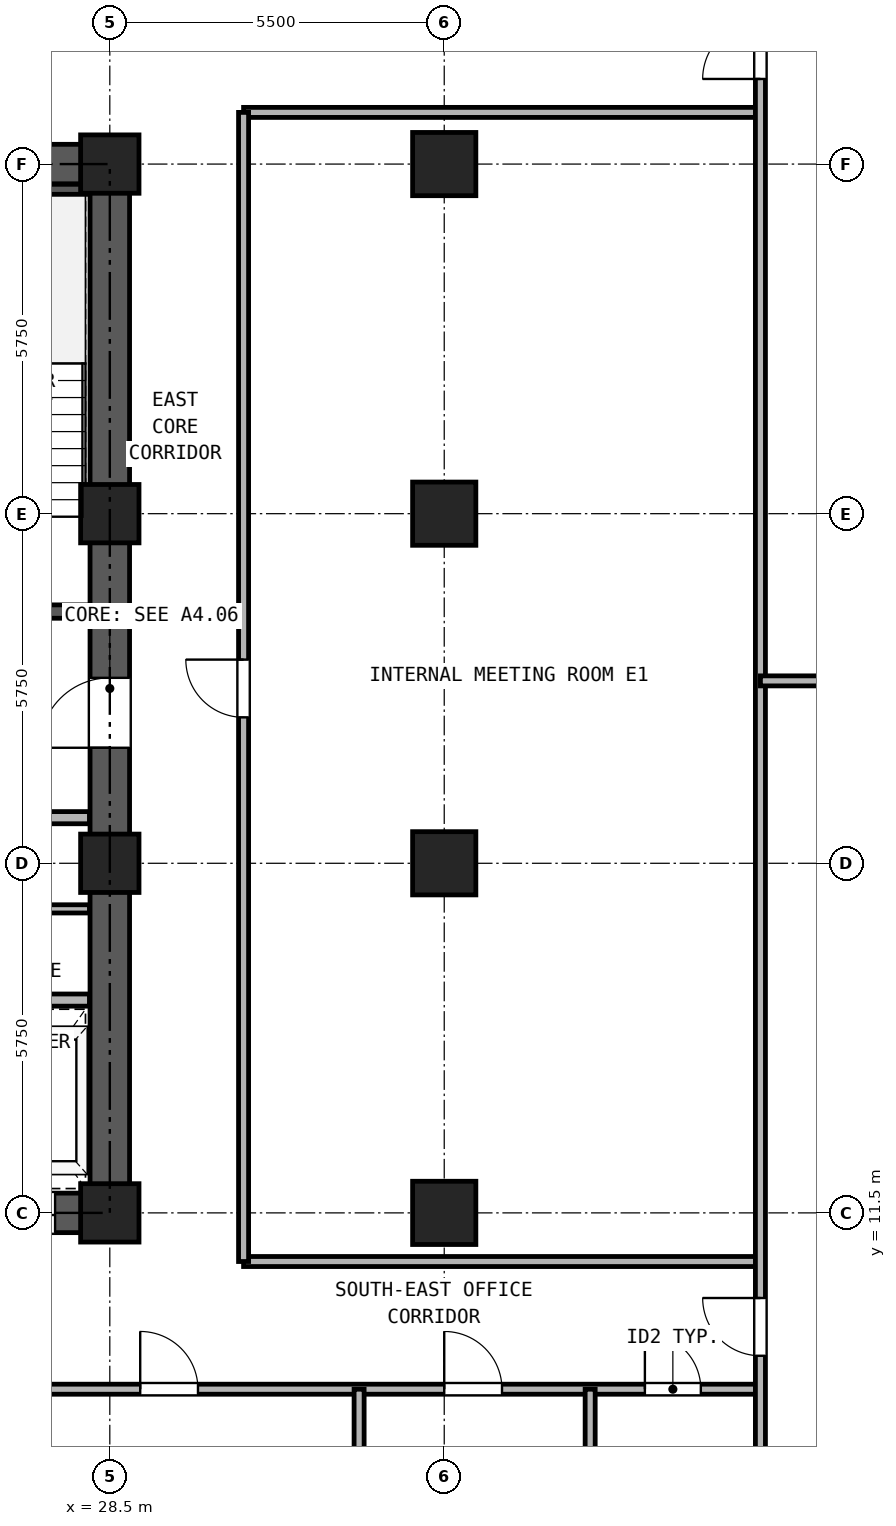
"""IFC4 building model, lengths in metres.
Left out: names, types, materials, properties, quantities, classifications, styles, units other than length and angle.
Written with IfcOpenShell. Run it as: python <this file> out.ifc"""

import sys

from ifc_helpers import new_model, si_unit, direction, frame, frame_2d, origin, origin_2d, place, context, subcontext, project, spatial, rectangle, hollow_rectangle, extrude, source, transform, mapped, element, fill, save


model = new_model("IFC4")
c1 = context("Model", 3, precision=1e-05, world=origin(), true_north=direction((0.0, 1.0)))
c2 = subcontext(c1, "Body", "Model", "MODEL_VIEW")
j1 = project(units=[si_unit("LENGTHUNIT", "METRE"), si_unit("PLANEANGLEUNIT", "RADIAN")], contexts=[c1])
p1 = place(None, origin())
s1 = spatial("IfcSite", under=j1, at=p1, CompositionType="ELEMENT")
p2 = place(p1, origin())
s2 = spatial("IfcBuilding", under=s1, at=p2, CompositionType="ELEMENT")
p3 = place(p2, frame((0.0, 0.0, 69.3)))
s3 = spatial("IfcBuildingStorey", under=s2, at=p3, CompositionType="ELEMENT", Elevation=69.3)
m1 = source(origin(), c2, "Body", "SweptSolid", [
    extrude(hollow_rectangle(XDim=0.96, YDim=0.96, WallThickness=0.06, at=origin_2d()), origin(), (0.0, 0.0, 1.0), 3.32),
])
for number, where, z_axis, x_axis in (
    (1, (28.5, 11.5, 0.0), (0.0, 0.0, 1.0), (1.0, 0.0, 0.0)),
    (2, (28.5, 17.25, 0.0), (0.0, 0.0, 1.0), (1.0, 0.0, 0.0)),
    (3, (28.5, 23.0, 0.0), (0.0, 0.0, 1.0), (1.0, 0.0, 0.0)),
    (4, (28.5, 28.75, 0.0), (0.0, 0.0, 1.0), (1.0, 0.0, 0.0)),
):
    element("IfcColumn", number, at=place(p3, frame(where, z_axis=z_axis, x_axis=x_axis)), inside=s3, PredefinedType="COLUMN", context=c2, shape_type="MappedRepresentation", body=[
        mapped(m1, transform((0.0, 0.0, 0.0), x_axis=(1.0, 0.0, 0.0), y_axis=(0.0, 1.0, 0.0), z_axis=(0.0, 0.0, 1.0), scale=1.0)),
    ])
m2 = source(origin(), c2, "Body", "SweptSolid", [
    extrude(hollow_rectangle(XDim=1.04, YDim=1.04, WallThickness=0.065, at=origin_2d()), origin(), (0.0, 0.0, 1.0), 3.32),
])
for number, where, z_axis, x_axis in (
    (5, (34.0, 11.5, 0.0), (0.0, 0.0, 1.0), (1.0, 0.0, 0.0)),
    (6, (34.0, 17.25, 0.0), (0.0, 0.0, 1.0), (1.0, 0.0, 0.0)),
    (7, (34.0, 23.0, 0.0), (0.0, 0.0, 1.0), (1.0, 0.0, 0.0)),
    (8, (34.0, 28.75, 0.0), (0.0, 0.0, 1.0), (1.0, 0.0, 0.0)),
):
    element("IfcColumn", number, at=place(p3, frame(where, z_axis=z_axis, x_axis=x_axis)), inside=s3, PredefinedType="COLUMN", context=c2, shape_type="MappedRepresentation", body=[
        mapped(m2, transform((0.0, 0.0, 0.0), x_axis=(1.0, 0.0, 0.0), y_axis=(0.0, 1.0, 0.0), z_axis=(0.0, 0.0, 1.0), scale=1.0)),
    ])
p4 = place(p3, frame((18.175, 11.5, 0.0), z_axis=(0.0, 0.0, 1.0), x_axis=(1.0, 0.0, 0.0)))
e9 = element("IfcWall", 9, at=p4, inside=s3, PredefinedType="SHEAR", context=c2, shape_type="SweptSolid", body=[
    extrude(rectangle(XDim=10.65, YDim=0.65, at=frame_2d((5.325, 0.0))), origin(), (0.0, 0.0, 1.0), 3.32),
])
p5 = place(p4, frame((1.195, 0.0, 0.0)))
e10 = element("IfcOpeningElement", 10, at=p5, cuts=e9, PredefinedType="OPENING", context=c2, shape_type="SweptSolid", body=[
    extrude(rectangle(XDim=1.1, YDim=2.25, at=frame_2d((0.55, 1.125))), frame((0.0, 0.335, 0.0), z_axis=(0.0, -1.0, 0.0), x_axis=(1.0, 0.0, 0.0)), (0.0, 0.0, 1.0), 0.67),
])
p6 = place(p4, frame((3.495, 0.0, 0.0)))
e11 = element("IfcOpeningElement", 11, at=p6, cuts=e9, PredefinedType="OPENING", context=c2, shape_type="SweptSolid", body=[
    extrude(rectangle(XDim=1.1, YDim=2.25, at=frame_2d((0.55, 1.125))), frame((0.0, 0.335, 0.0), z_axis=(0.0, -1.0, 0.0), x_axis=(1.0, 0.0, 0.0)), (0.0, 0.0, 1.0), 0.67),
])
p7 = place(p4, frame((5.925, 0.0, 0.0)))
e12 = element("IfcOpeningElement", 12, at=p7, cuts=e9, PredefinedType="OPENING", context=c2, shape_type="SweptSolid", body=[
    extrude(rectangle(XDim=1.1, YDim=2.25, at=frame_2d((0.55, 1.125))), frame((0.0, 0.335, 0.0), z_axis=(0.0, -1.0, 0.0), x_axis=(1.0, 0.0, 0.0)), (0.0, 0.0, 1.0), 0.67),
])
p8 = place(p4, frame((8.325, 0.0, 0.0)))
e13 = element("IfcOpeningElement", 13, at=p8, cuts=e9, PredefinedType="OPENING", context=c2, shape_type="SweptSolid", body=[
    extrude(rectangle(XDim=1.1, YDim=2.25, at=frame_2d((0.55, 1.125))), frame((0.0, 0.335, 0.0), z_axis=(0.0, -1.0, 0.0), x_axis=(1.0, 0.0, 0.0)), (0.0, 0.0, 1.0), 0.67),
])
p9 = place(p3, frame((18.175, 28.75, 0.0), z_axis=(0.0, 0.0, 1.0), x_axis=(1.0, 0.0, 0.0)))
e14 = element("IfcWall", 14, at=p9, inside=s3, PredefinedType="SHEAR", context=c2, shape_type="SweptSolid", body=[
    extrude(rectangle(XDim=10.65, YDim=0.65, at=frame_2d((5.325, 0.0))), origin(), (0.0, 0.0, 1.0), 3.32),
])
p10 = place(p9, frame((4.205, 0.0, 0.0)))
e15 = element("IfcOpeningElement", 15, at=p10, cuts=e14, PredefinedType="OPENING", context=c2, shape_type="SweptSolid", body=[
    extrude(rectangle(XDim=0.9, YDim=2.05, at=frame_2d((0.45, 1.025))), frame((0.0, 0.335, 0.0), z_axis=(0.0, -1.0, 0.0), x_axis=(1.0, 0.0, 0.0)), (0.0, 0.0, 1.0), 0.67),
])
p11 = place(p9, frame((5.745, 0.0, 0.0)))
e16 = element("IfcOpeningElement", 16, at=p11, cuts=e14, PredefinedType="OPENING", context=c2, shape_type="SweptSolid", body=[
    extrude(rectangle(XDim=0.9, YDim=2.05, at=frame_2d((0.45, 1.025))), frame((0.0, 0.335, 0.0), z_axis=(0.0, -1.0, 0.0), x_axis=(1.0, 0.0, 0.0)), (0.0, 0.0, 1.0), 0.67),
])
p12 = place(p3, frame((28.5, 11.825, 0.0), z_axis=(0.0, 0.0, 1.0), x_axis=(0.0, 1.0, 0.0)))
e17 = element("IfcWall", 17, at=p12, inside=s3, PredefinedType="SHEAR", context=c2, shape_type="SweptSolid", body=[
    extrude(rectangle(XDim=16.6, YDim=0.65, at=frame_2d((8.3, 0.0))), origin(), (0.0, 0.0, 1.0), 3.32),
])
p13 = place(p12, frame((7.325, 0.0, 0.0)))
e18 = element("IfcOpeningElement", 18, at=p13, cuts=e17, PredefinedType="OPENING", context=c2, shape_type="SweptSolid", body=[
    extrude(rectangle(XDim=1.15, YDim=2.2, at=frame_2d((0.575, 1.1))), frame((0.0, 0.335, 0.0), z_axis=(0.0, -1.0, 0.0), x_axis=(1.0, 0.0, 0.0)), (0.0, 0.0, 1.0), 0.67),
])
p14 = place(p3, frame((25.13, 28.335, 0.0), z_axis=(0.0, 0.0, 1.0), x_axis=(1.0, 0.0, 0.0)))
e19 = element("IfcWall", 19, at=p14, inside=s3, PredefinedType="PARTITIONING", context=c2, shape_type="SweptSolid", body=[
    extrude(rectangle(XDim=3.035, YDim=0.165, at=frame_2d((1.518, 0.0))), origin(), (0.0, 0.0, 1.0), 3.32),
])
p15 = place(p3, frame((25.13, 21.39, 0.0), z_axis=(0.0, 0.0, 1.0), x_axis=(1.0, 0.0, 0.0)))
e20 = element("IfcWall", 20, at=p15, inside=s3, PredefinedType="SOLIDWALL", context=c2, shape_type="SweptSolid", body=[
    extrude(rectangle(XDim=3.035, YDim=0.22, at=frame_2d((1.518, 0.0))), origin(), (0.0, 0.0, 1.0), 3.32),
])
p16 = place(p15, frame((0.92, 0.0, 0.0)))
e21 = element("IfcOpeningElement", 21, at=p16, cuts=e20, PredefinedType="OPENING", context=c2, shape_type="SweptSolid", body=[
    extrude(rectangle(XDim=1.15, YDim=2.2, at=frame_2d((0.575, 1.1))), frame((0.0, 0.12, 0.0), z_axis=(0.0, -1.0, 0.0), x_axis=(1.0, 0.0, 0.0)), (0.0, 0.0, 1.0), 0.24),
])
p17 = place(p3, frame((18.835, 18.0, 0.0), z_axis=(0.0, 0.0, 1.0), x_axis=(1.0, 0.0, 0.0)))
e22 = element("IfcWall", 22, at=p17, inside=s3, PredefinedType="PARTITIONING", context=c2, shape_type="SweptSolid", body=[
    extrude(rectangle(XDim=9.33, YDim=0.2, at=frame_2d((4.665, 0.0))), origin(), (0.0, 0.0, 1.0), 3.32),
])
p18 = place(p17, frame((0.415, 0.0, 0.0)))
e23 = element("IfcOpeningElement", 23, at=p18, cuts=e22, PredefinedType="OPENING", context=c2, shape_type="SweptSolid", body=[
    extrude(rectangle(XDim=1.3, YDim=2.3, at=frame_2d((0.65, 1.15))), frame((0.0, 0.11, 0.0), z_axis=(0.0, -1.0, 0.0), x_axis=(1.0, 0.0, 0.0)), (0.0, 0.0, 1.0), 0.22),
])
p19 = place(p17, frame((2.515, 0.0, 0.0)))
e24 = element("IfcOpeningElement", 24, at=p19, cuts=e22, PredefinedType="OPENING", context=c2, shape_type="SweptSolid", body=[
    extrude(rectangle(XDim=1.3, YDim=2.3, at=frame_2d((0.65, 1.15))), frame((0.0, 0.11, 0.0), z_axis=(0.0, -1.0, 0.0), x_axis=(1.0, 0.0, 0.0)), (0.0, 0.0, 1.0), 0.22),
])
p20 = place(p17, frame((7.015, 0.0, 0.0)))
e25 = element("IfcOpeningElement", 25, at=p20, cuts=e22, PredefinedType="OPENING", context=c2, shape_type="SweptSolid", body=[
    extrude(rectangle(XDim=1.0, YDim=2.15, at=frame_2d((0.5, 1.075))), frame((0.0, 0.11, 0.0), z_axis=(0.0, -1.0, 0.0), x_axis=(1.0, 0.0, 0.0)), (0.0, 0.0, 1.0), 0.22),
])
p21 = place(p3, frame((18.835, 15.0, 0.0), z_axis=(0.0, 0.0, 1.0), x_axis=(1.0, 0.0, 0.0)))
e26 = element("IfcWall", 26, at=p21, inside=s3, PredefinedType="PARTITIONING", context=c2, shape_type="SweptSolid", body=[
    extrude(rectangle(XDim=9.33, YDim=0.2, at=frame_2d((4.665, 0.0))), origin(), (0.0, 0.0, 1.0), 3.32),
])
p22 = place(p3, frame((23.3, 16.5, 0.0), z_axis=(0.0, 0.0, 1.0), x_axis=(1.0, 0.0, 0.0)))
e27 = element("IfcWall", 27, at=p22, inside=s3, PredefinedType="PARTITIONING", context=c2, shape_type="SweptSolid", body=[
    extrude(rectangle(XDim=4.865, YDim=0.135, at=frame_2d((2.433, 0.0))), origin(), (0.0, 0.0, 1.0), 3.32),
])
p23 = place(p22, frame((2.55, 0.0, 0.0)))
e28 = element("IfcOpeningElement", 28, at=p23, cuts=e27, PredefinedType="OPENING", context=c2, shape_type="SweptSolid", body=[
    extrude(rectangle(XDim=0.9, YDim=2.05, at=frame_2d((0.45, 1.025))), frame((0.0, 0.077, 0.0), z_axis=(0.0, -1.0, 0.0), x_axis=(1.0, 0.0, 0.0)), (0.0, 0.0, 1.0), 0.155),
])
p24 = place(p3, frame((7.8, 8.6, 0.0), z_axis=(0.0, 0.0, 1.0), x_axis=(1.0, 0.0, 0.0)))
e29 = element("IfcWall", 29, at=p24, inside=s3, PredefinedType="PARTITIONING", context=c2, shape_type="SweptSolid", body=[
    extrude(rectangle(XDim=31.4, YDim=0.165, at=frame_2d((15.7, 0.0))), origin(), (0.0, 0.0, 1.0), 2.898),
])
p25 = place(p24, frame((2.6, 0.0, 0.0)))
e30 = element("IfcOpeningElement", 30, at=p25, cuts=e29, PredefinedType="OPENING", context=c2, shape_type="SweptSolid", body=[
    extrude(rectangle(XDim=0.95, YDim=2.15, at=frame_2d((0.475, 1.075))), frame((0.0, 0.093, 0.0), z_axis=(0.0, -1.0, 0.0), x_axis=(1.0, 0.0, 0.0)), (0.0, 0.0, 1.0), 0.185),
])
p26 = place(p24, frame((8.8, 0.0, 0.0)))
e31 = element("IfcOpeningElement", 31, at=p26, cuts=e29, PredefinedType="OPENING", context=c2, shape_type="SweptSolid", body=[
    extrude(rectangle(XDim=0.95, YDim=2.15, at=frame_2d((0.475, 1.075))), frame((0.0, 0.093, 0.0), z_axis=(0.0, -1.0, 0.0), x_axis=(1.0, 0.0, 0.0)), (0.0, 0.0, 1.0), 0.185),
])
p27 = place(p24, frame((15.0, 0.0, 0.0)))
e32 = element("IfcOpeningElement", 32, at=p27, cuts=e29, PredefinedType="OPENING", context=c2, shape_type="SweptSolid", body=[
    extrude(rectangle(XDim=0.95, YDim=2.15, at=frame_2d((0.475, 1.075))), frame((0.0, 0.093, 0.0), z_axis=(0.0, -1.0, 0.0), x_axis=(1.0, 0.0, 0.0)), (0.0, 0.0, 1.0), 0.185),
])
p28 = place(p24, frame((21.2, 0.0, 0.0)))
e33 = element("IfcOpeningElement", 33, at=p28, cuts=e29, PredefinedType="OPENING", context=c2, shape_type="SweptSolid", body=[
    extrude(rectangle(XDim=0.95, YDim=2.15, at=frame_2d((0.475, 1.075))), frame((0.0, 0.093, 0.0), z_axis=(0.0, -1.0, 0.0), x_axis=(1.0, 0.0, 0.0)), (0.0, 0.0, 1.0), 0.185),
])
p29 = place(p24, frame((26.2, 0.0, 0.0)))
e34 = element("IfcOpeningElement", 34, at=p29, cuts=e29, PredefinedType="OPENING", context=c2, shape_type="SweptSolid", body=[
    extrude(rectangle(XDim=0.95, YDim=2.15, at=frame_2d((0.475, 1.075))), frame((0.0, 0.093, 0.0), z_axis=(0.0, -1.0, 0.0), x_axis=(1.0, 0.0, 0.0)), (0.0, 0.0, 1.0), 0.185),
])
p30 = place(p24, frame((29.5, 0.0, 0.0)))
e35 = element("IfcOpeningElement", 35, at=p30, cuts=e29, PredefinedType="OPENING", context=c2, shape_type="SweptSolid", body=[
    extrude(rectangle(XDim=0.92, YDim=2.1, at=frame_2d((0.46, 1.05))), frame((0.0, 0.093, 0.0), z_axis=(0.0, -1.0, 0.0), x_axis=(1.0, 0.0, 0.0)), (0.0, 0.0, 1.0), 0.185),
])
for number, where, z_axis, x_axis in (
    (36, (30.7, 10.7, 0.0), (0.0, 0.0, 1.0), (1.0, 0.0, 0.0)),
    (37, (30.7, 29.6, 0.0), (0.0, 0.0, 1.0), (1.0, 0.0, 0.0)),
):
    element("IfcWall", number, at=place(p3, frame(where, z_axis=z_axis, x_axis=x_axis)), inside=s3, PredefinedType="PARTITIONING", context=c2, shape_type="SweptSolid", body=[
        extrude(rectangle(XDim=8.5, YDim=0.165, at=frame_2d((4.25, 0.0))), origin(), (0.0, 0.0, 1.0), 3.32),
    ])
p31 = place(p3, frame((30.7, 10.7, 0.0), z_axis=(0.0, 0.0, 1.0), x_axis=(0.0, 1.0, 0.0)))
e38 = element("IfcWall", 38, at=p31, inside=s3, PredefinedType="PARTITIONING", context=c2, shape_type="SweptSolid", body=[
    extrude(rectangle(XDim=18.9, YDim=0.165, at=frame_2d((9.45, 0.0))), origin(), (0.0, 0.0, 1.0), 3.32),
])
p32 = place(p31, frame((8.95, 0.0, 0.0)))
e39 = element("IfcOpeningElement", 39, at=p32, cuts=e38, PredefinedType="OPENING", context=c2, shape_type="SweptSolid", body=[
    extrude(rectangle(XDim=0.95, YDim=2.15, at=frame_2d((0.475, 1.075))), frame((0.0, 0.093, 0.0), z_axis=(0.0, -1.0, 0.0), x_axis=(1.0, 0.0, 0.0)), (0.0, 0.0, 1.0), 0.185),
])
p33 = place(p3, frame((39.2, 0.16, 0.0), z_axis=(0.0, 0.0, 1.0), x_axis=(0.0, 1.0, 0.0)))
e40 = element("IfcWall", 40, at=p33, inside=s3, PredefinedType="PARTITIONING", context=c2, shape_type="SweptSolid", body=[
    extrude(rectangle(XDim=40.18, YDim=0.165, at=frame_2d((20.09, 0.0))), origin(), (0.0, 0.0, 1.0), 3.32),
])
p34 = place(p33, frame((8.99, 0.0, 0.0)))
e41 = element("IfcOpeningElement", 41, at=p34, cuts=e40, PredefinedType="OPENING", context=c2, shape_type="SweptSolid", body=[
    extrude(rectangle(XDim=0.95, YDim=2.15, at=frame_2d((0.475, 1.075))), frame((0.0, 0.093, 0.0), z_axis=(0.0, -1.0, 0.0), x_axis=(1.0, 0.0, 0.0)), (0.0, 0.0, 1.0), 0.185),
])
p35 = place(p33, frame((29.99, 0.0, 0.0)))
e42 = element("IfcOpeningElement", 42, at=p35, cuts=e40, PredefinedType="OPENING", context=c2, shape_type="SweptSolid", body=[
    extrude(rectangle(XDim=0.95, YDim=2.15, at=frame_2d((0.475, 1.075))), frame((0.0, 0.093, 0.0), z_axis=(0.0, -1.0, 0.0), x_axis=(1.0, 0.0, 0.0)), (0.0, 0.0, 1.0), 0.185),
])
for number, where, z_axis, x_axis in (
    (43, (32.6, 0.16, 0.0), (0.0, 0.0, 1.0), (0.0, 1.0, 0.0)),
    (44, (36.4, 0.16, 0.0), (0.0, 0.0, 1.0), (0.0, 1.0, 0.0)),
):
    element("IfcWall", number, at=place(p3, frame(where, z_axis=z_axis, x_axis=x_axis)), inside=s3, PredefinedType="PARTITIONING", context=c2, shape_type="SweptSolid", body=[
        extrude(rectangle(XDim=8.44, YDim=0.165, at=frame_2d((4.22, 0.0))), origin(), (0.0, 0.0, 1.0), 3.32),
    ])
p36 = place(p3, frame((39.2, 20.25, 0.0), z_axis=(0.0, 0.0, 1.0), x_axis=(1.0, 0.0, 0.0)))
e45 = element("IfcWall", 45, at=p36, inside=s3, PredefinedType="PARTITIONING", context=c2, shape_type="SweptSolid", body=[
    extrude(rectangle(XDim=7.64, YDim=0.165, at=frame_2d((3.82, 0.0))), origin(), (0.0, 0.0, 1.0), 2.898),
])
p37 = place(p13, origin())
e46 = element("IfcDoor", 46, at=p37, inside=s3, OperationType="SINGLE_SWING_LEFT", PredefinedType="DOOR", context=c2, shape_type="SweptSolid", body=[
    extrude(rectangle(XDim=1.15, YDim=2.2, at=frame_2d((0.575, 1.1))), frame((0.0, 0.025, 0.0), z_axis=(0.0, -1.0, 0.0), x_axis=(1.0, 0.0, 0.0)), (0.0, 0.0, 1.0), 0.05),
])
fill(e18, e46)
p38 = place(p8, frame((1.1, 0.0, 0.0), z_axis=(0.0, 0.0, 1.0), x_axis=(-1.0, 0.0, 0.0)))
e47 = element("IfcDoor", 47, at=p38, inside=s3, OperationType="DOUBLE_DOOR_SLIDING", PredefinedType="DOOR", context=c2, shape_type="SweptSolid", body=[
    extrude(rectangle(XDim=1.1, YDim=2.25, at=frame_2d((0.55, 1.125))), frame((0.0, 0.025, 0.0), z_axis=(0.0, -1.0, 0.0), x_axis=(1.0, 0.0, 0.0)), (0.0, 0.0, 1.0), 0.05),
])
fill(e13, e47)
p39 = place(p28, frame((0.95, 0.0, 0.0), z_axis=(0.0, 0.0, 1.0), x_axis=(-1.0, 0.0, 0.0)))
e48 = element("IfcDoor", 48, at=p39, inside=s3, OperationType="SINGLE_SWING_LEFT", PredefinedType="DOOR", context=c2, shape_type="SweptSolid", body=[
    extrude(rectangle(XDim=0.95, YDim=2.15, at=frame_2d((0.475, 1.075))), frame((0.0, 0.025, 0.0), z_axis=(0.0, -1.0, 0.0), x_axis=(1.0, 0.0, 0.0)), (0.0, 0.0, 1.0), 0.05),
])
fill(e33, e48)
p40 = place(p29, frame((0.95, 0.0, 0.0), z_axis=(0.0, 0.0, 1.0), x_axis=(-1.0, 0.0, 0.0)))
e49 = element("IfcDoor", 49, at=p40, inside=s3, OperationType="SINGLE_SWING_LEFT", PredefinedType="DOOR", context=c2, shape_type="SweptSolid", body=[
    extrude(rectangle(XDim=0.95, YDim=2.15, at=frame_2d((0.475, 1.075))), frame((0.0, 0.025, 0.0), z_axis=(0.0, -1.0, 0.0), x_axis=(1.0, 0.0, 0.0)), (0.0, 0.0, 1.0), 0.05),
])
fill(e34, e49)
p41 = place(p30, frame((0.92, 0.0, 0.0), z_axis=(0.0, 0.0, 1.0), x_axis=(-1.0, 0.0, 0.0)))
e50 = element("IfcDoor", 50, at=p41, inside=s3, OperationType="SINGLE_SWING_LEFT", PredefinedType="DOOR", context=c2, shape_type="SweptSolid", body=[
    extrude(rectangle(XDim=0.92, YDim=2.1, at=frame_2d((0.46, 1.05))), frame((0.0, 0.025, 0.0), z_axis=(0.0, -1.0, 0.0), x_axis=(1.0, 0.0, 0.0)), (0.0, 0.0, 1.0), 0.05),
])
fill(e35, e50)
p42 = place(p34, origin())
e51 = element("IfcDoor", 51, at=p42, inside=s3, OperationType="SINGLE_SWING_RIGHT", PredefinedType="DOOR", context=c2, shape_type="SweptSolid", body=[
    extrude(rectangle(XDim=0.95, YDim=2.15, at=frame_2d((0.475, 1.075))), frame((0.0, 0.025, 0.0), z_axis=(0.0, -1.0, 0.0), x_axis=(1.0, 0.0, 0.0)), (0.0, 0.0, 1.0), 0.05),
])
fill(e41, e51)
p43 = place(p35, origin())
e52 = element("IfcDoor", 52, at=p43, inside=s3, OperationType="SINGLE_SWING_LEFT", PredefinedType="DOOR", context=c2, shape_type="SweptSolid", body=[
    extrude(rectangle(XDim=0.95, YDim=2.15, at=frame_2d((0.475, 1.075))), frame((0.0, 0.025, 0.0), z_axis=(0.0, -1.0, 0.0), x_axis=(1.0, 0.0, 0.0)), (0.0, 0.0, 1.0), 0.05),
])
fill(e42, e52)
p44 = place(p32, origin())
e53 = element("IfcDoor", 53, at=p44, inside=s3, OperationType="SINGLE_SWING_RIGHT", PredefinedType="DOOR", context=c2, shape_type="SweptSolid", body=[
    extrude(rectangle(XDim=0.95, YDim=2.15, at=frame_2d((0.475, 1.075))), frame((0.0, 0.025, 0.0), z_axis=(0.0, -1.0, 0.0), x_axis=(1.0, 0.0, 0.0)), (0.0, 0.0, 1.0), 0.05),
])
fill(e39, e53)
save(model, sys.argv[1])
